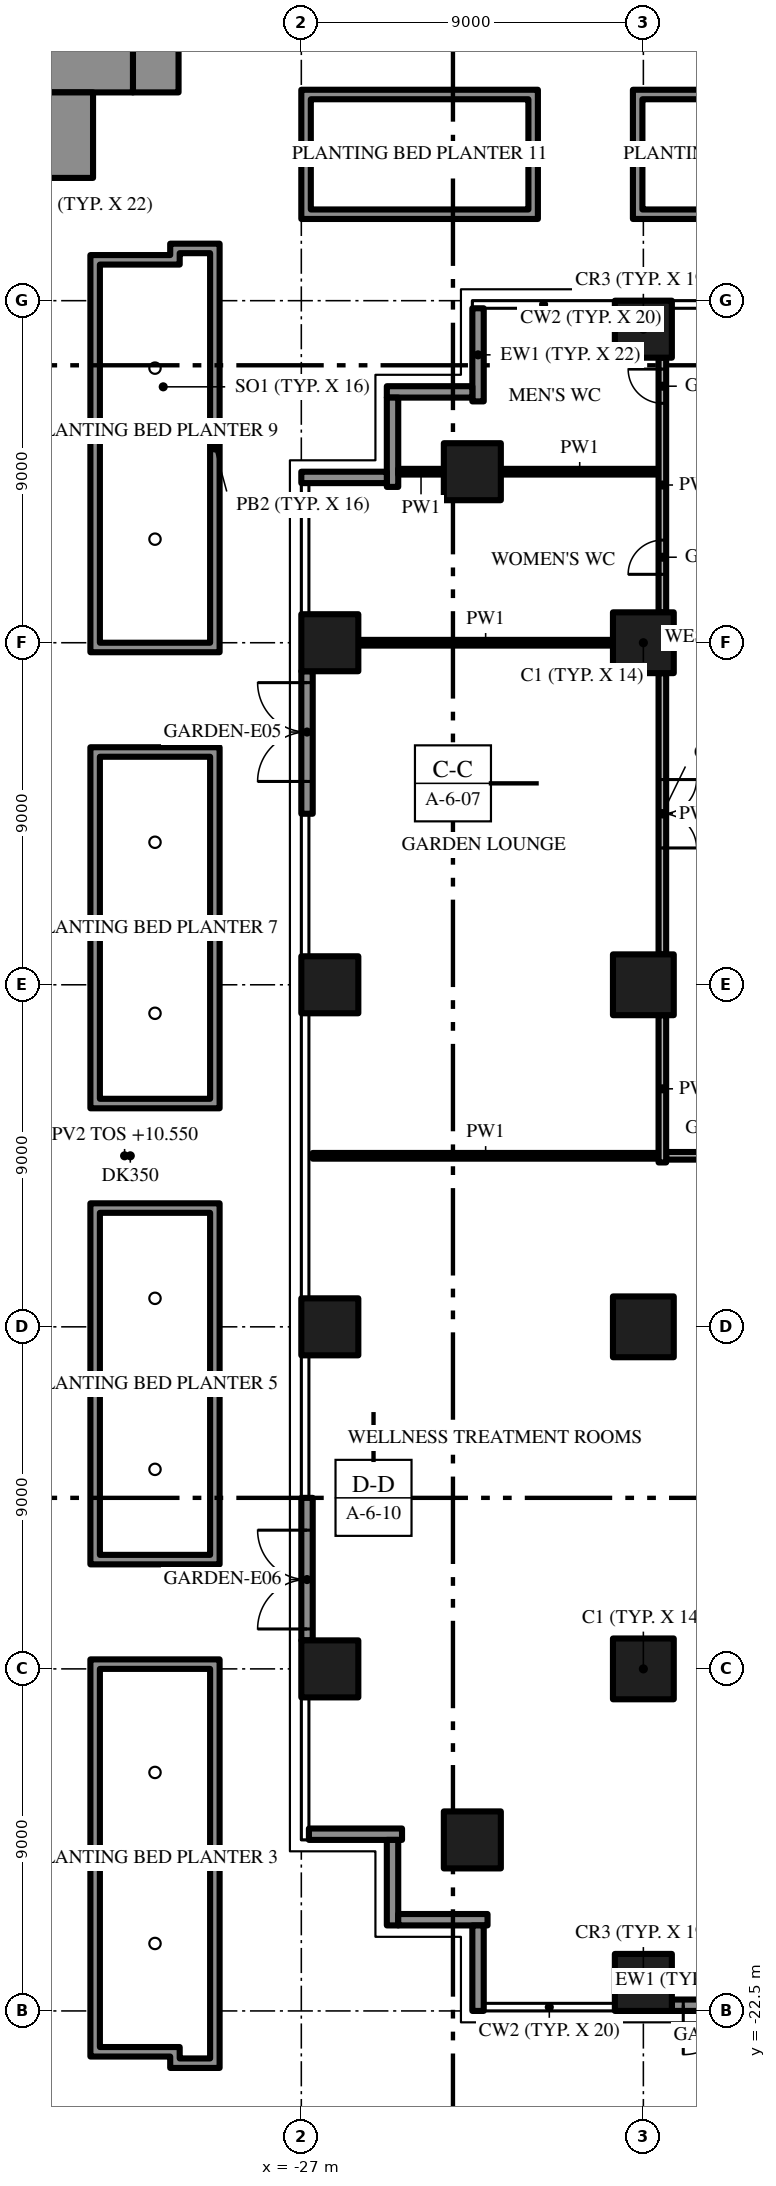
"""IFC4 building model, lengths in metres.
Left out: names, types, materials, properties, quantities, classifications, styles, units other than length and angle.
Written with IfcOpenShell. Run it as: python <this file> out.ifc"""

import sys

from ifc_helpers import new_model, si_unit, direction, frame, frame_2d, origin, origin_2d, place, context, subcontext, project, spatial, polyline, rectangle, outline, extrude, element, fill, save


model = new_model("IFC4")
c1 = context("Model", 3, precision=1e-05, world=origin(), true_north=direction((0.0, 1.0)))
c2 = subcontext(c1, "Body", "Model", "MODEL_VIEW")
j1 = project(units=[si_unit("LENGTHUNIT", "METRE"), si_unit("PLANEANGLEUNIT", "RADIAN")], contexts=[c1])
p1 = place(None, origin())
s1 = spatial("IfcSite", under=j1, at=p1, CompositionType="ELEMENT")
p2 = place(p1, origin())
s2 = spatial("IfcBuilding", under=s1, at=p2, CompositionType="ELEMENT")
p3 = place(p2, frame((0.0, 0.0, 10.5)))
s3 = spatial("IfcBuildingStorey", under=s2, at=p3, CompositionType="ELEMENT", Elevation=10.5)
p4 = place(p3, frame((-18.0, -13.5, 0.0), z_axis=(0.0, 0.0, 1.0), x_axis=(1.0, 0.0, 0.0)))
e1 = element("IfcColumn", 1, at=p4, inside=s3, PredefinedType="COLUMN", context=c2, shape_type="SweptSolid", body=[
    extrude(rectangle(XDim=1.6, YDim=1.6, at=origin_2d()), origin(), (0.0, 0.0, 1.0), 4.2),
])
p5 = place(p3, frame((-18.0, -21.75, 0.0), z_axis=(0.0, 0.0, 1.0), x_axis=(1.0, 0.0, 0.0)))
e2 = element("IfcColumn", 2, at=p5, inside=s3, PredefinedType="COLUMN", context=c2, shape_type="SweptSolid", body=[
    extrude(rectangle(XDim=1.5, YDim=1.5, at=origin_2d()), origin(), (0.0, 0.0, 1.0), 4.2),
])
for number, where, z_axis, x_axis in (
    (3, (-18.0, -4.5, 0.0), (0.0, 0.0, 1.0), (1.0, 0.0, 0.0)),
    (4, (-18.0, 13.5, 0.0), (0.0, 0.0, 1.0), (1.0, 0.0, 0.0)),
):
    element("IfcColumn", number, at=place(p3, frame(where, z_axis=z_axis, x_axis=x_axis)), inside=s3, PredefinedType="COLUMN", context=c2, shape_type="SweptSolid", body=[
        extrude(rectangle(XDim=1.6, YDim=1.6, at=origin_2d()), origin(), (0.0, 0.0, 1.0), 4.2),
    ])
p6 = place(p3, frame((-18.0, 21.75, 0.0), z_axis=(0.0, 0.0, 1.0), x_axis=(1.0, 0.0, 0.0)))
e5 = element("IfcColumn", 5, at=p6, inside=s3, PredefinedType="COLUMN", context=c2, shape_type="SweptSolid", body=[
    extrude(rectangle(XDim=1.5, YDim=1.5, at=origin_2d()), origin(), (0.0, 0.0, 1.0), 4.2),
])
p7 = place(p3, frame((-18.0, 4.5, 0.0), z_axis=(0.0, 0.0, 1.0), x_axis=(1.0, 0.0, 0.0)))
e6 = element("IfcColumn", 6, at=p7, inside=s3, PredefinedType="COLUMN", context=c2, shape_type="SweptSolid", body=[
    extrude(rectangle(XDim=1.6, YDim=1.6, at=origin_2d()), origin(), (0.0, 0.0, 1.0), 4.2),
])
for number, where, z_axis, x_axis in (
    (7, (-26.25, -13.5, 0.0), (0.0, 0.0, 1.0), (1.0, 0.0, 0.0)),
    (8, (-22.5, -18.0, 0.0), (0.0, 0.0, 1.0), (1.0, 0.0, 0.0)),
    (9, (-26.25, -4.5, 0.0), (0.0, 0.0, 1.0), (1.0, 0.0, 0.0)),
    (10, (-26.25, 13.5, 0.0), (0.0, 0.0, 1.0), (1.0, 0.0, 0.0)),
    (11, (-22.5, 18.0, 0.0), (0.0, 0.0, 1.0), (1.0, 0.0, 0.0)),
    (12, (-26.25, 4.5, 0.0), (0.0, 0.0, 1.0), (1.0, 0.0, 0.0)),
):
    element("IfcColumn", number, at=place(p3, frame(where, z_axis=z_axis, x_axis=x_axis)), inside=s3, PredefinedType="COLUMN", context=c2, shape_type="SweptSolid", body=[
        extrude(rectangle(XDim=1.5, YDim=1.5, at=origin_2d()), origin(), (0.0, 0.0, 1.0), 4.2),
    ])
p8 = place(p3, frame((-13.5, -22.35, 0.0), z_axis=(0.0, 0.0, 1.0), x_axis=(-1.0, 0.0, 0.0)))
e13 = element("IfcWall", 13, at=p8, inside=s3, PredefinedType="SOLIDWALL", context=c2, shape_type="SweptSolid", body=[
    extrude(rectangle(XDim=3.75, YDim=0.3, at=frame_2d((1.875, 0.0))), origin(), (0.0, 0.0, 1.0), 4.2),
])
p9 = place(p8, frame((0.85, 0.0, 0.0)))
e14 = element("IfcOpeningElement", 14, at=p9, cuts=e13, PredefinedType="OPENING", context=c2, shape_type="SweptSolid", body=[
    extrude(rectangle(XDim=2.6, YDim=2.4, at=frame_2d((1.3, 1.2))), frame((0.0, 0.16, 0.0), z_axis=(0.0, -1.0, 0.0), x_axis=(1.0, 0.0, 0.0)), (0.0, 0.0, 1.0), 0.32),
])
p10 = place(p3, frame((-22.35, 19.85, 0.0), z_axis=(0.0, 0.0, 1.0), x_axis=(0.0, 1.0, 0.0)))
e15 = element("IfcWall", 15, at=p10, inside=s3, PredefinedType="SOLIDWALL", context=c2, shape_type="SweptSolid", body=[
    extrude(rectangle(XDim=2.45, YDim=0.3, at=frame_2d((1.225, 0.0))), origin(), (0.0, 0.0, 1.0), 4.2),
])
p11 = place(p3, frame((-24.75, 20.1, 0.0), z_axis=(0.0, 0.0, 1.0), x_axis=(1.0, 0.0, 0.0)))
e16 = element("IfcWall", 16, at=p11, inside=s3, PredefinedType="SOLIDWALL", context=c2, shape_type="SweptSolid", body=[
    extrude(rectangle(XDim=2.25, YDim=0.3, at=frame_2d((1.125, 0.0))), origin(), (0.0, 0.0, 1.0), 4.2),
])
p12 = place(p3, frame((-24.6, 17.6, 0.0), z_axis=(0.0, 0.0, 1.0), x_axis=(0.0, 1.0, 0.0)))
e17 = element("IfcWall", 17, at=p12, inside=s3, PredefinedType="SOLIDWALL", context=c2, shape_type="SweptSolid", body=[
    extrude(rectangle(XDim=2.35, YDim=0.3, at=frame_2d((1.175, 0.0))), origin(), (0.0, 0.0, 1.0), 4.2),
])
p13 = place(p3, frame((-27.0, 17.85, 0.0), z_axis=(0.0, 0.0, 1.0), x_axis=(1.0, 0.0, 0.0)))
e18 = element("IfcWall", 18, at=p13, inside=s3, PredefinedType="SOLIDWALL", context=c2, shape_type="SweptSolid", body=[
    extrude(rectangle(XDim=2.25, YDim=0.3, at=frame_2d((1.125, 0.0))), origin(), (0.0, 0.0, 1.0), 4.2),
])
p14 = place(p3, frame((-26.85, 9.0, 0.0), z_axis=(0.0, 0.0, 1.0), x_axis=(0.0, 1.0, 0.0)))
e19 = element("IfcWall", 19, at=p14, inside=s3, PredefinedType="SOLIDWALL", context=c2, shape_type="SweptSolid", body=[
    extrude(rectangle(XDim=3.75, YDim=0.3, at=frame_2d((1.875, 0.0))), origin(), (0.0, 0.0, 1.0), 4.2),
])
p15 = place(p14, frame((0.85, 0.0, 0.0)))
e20 = element("IfcOpeningElement", 20, at=p15, cuts=e19, PredefinedType="OPENING", context=c2, shape_type="SweptSolid", body=[
    extrude(rectangle(XDim=2.6, YDim=2.4, at=frame_2d((1.3, 1.2))), frame((0.0, 0.16, 0.0), z_axis=(0.0, -1.0, 0.0), x_axis=(1.0, 0.0, 0.0)), (0.0, 0.0, 1.0), 0.32),
])
p16 = place(p3, frame((-26.85, -12.75, 0.0), z_axis=(0.0, 0.0, 1.0), x_axis=(0.0, 1.0, 0.0)))
e21 = element("IfcWall", 21, at=p16, inside=s3, PredefinedType="SOLIDWALL", context=c2, shape_type="SweptSolid", body=[
    extrude(rectangle(XDim=3.75, YDim=0.3, at=frame_2d((1.875, 0.0))), origin(), (0.0, 0.0, 1.0), 4.2),
])
p17 = place(p16, frame((0.3, 0.0, 0.0)))
e22 = element("IfcOpeningElement", 22, at=p17, cuts=e21, PredefinedType="OPENING", context=c2, shape_type="SweptSolid", body=[
    extrude(rectangle(XDim=2.6, YDim=2.4, at=frame_2d((1.3, 1.2))), frame((0.0, 0.16, 0.0), z_axis=(0.0, -1.0, 0.0), x_axis=(1.0, 0.0, 0.0)), (0.0, 0.0, 1.0), 0.32),
])
p18 = place(p3, frame((-24.35, -17.85, 0.0), z_axis=(0.0, 0.0, 1.0), x_axis=(-1.0, 0.0, 0.0)))
e23 = element("IfcWall", 23, at=p18, inside=s3, PredefinedType="SOLIDWALL", context=c2, shape_type="SweptSolid", body=[
    extrude(rectangle(XDim=2.45, YDim=0.3, at=frame_2d((1.225, 0.0))), origin(), (0.0, 0.0, 1.0), 4.2),
])
p19 = place(p3, frame((-24.6, -20.25, 0.0), z_axis=(0.0, 0.0, 1.0), x_axis=(0.0, 1.0, 0.0)))
e24 = element("IfcWall", 24, at=p19, inside=s3, PredefinedType="SOLIDWALL", context=c2, shape_type="SweptSolid", body=[
    extrude(rectangle(XDim=2.25, YDim=0.3, at=frame_2d((1.125, 0.0))), origin(), (0.0, 0.0, 1.0), 4.2),
])
p20 = place(p3, frame((-22.1, -20.1, 0.0), z_axis=(0.0, 0.0, 1.0), x_axis=(-1.0, 0.0, 0.0)))
e25 = element("IfcWall", 25, at=p20, inside=s3, PredefinedType="SOLIDWALL", context=c2, shape_type="SweptSolid", body=[
    extrude(rectangle(XDim=2.35, YDim=0.3, at=frame_2d((1.175, 0.0))), origin(), (0.0, 0.0, 1.0), 4.2),
])
p21 = place(p3, frame((-22.35, -22.5, 0.0), z_axis=(0.0, 0.0, 1.0), x_axis=(0.0, 1.0, 0.0)))
e26 = element("IfcWall", 26, at=p21, inside=s3, PredefinedType="SOLIDWALL", context=c2, shape_type="SweptSolid", body=[
    extrude(rectangle(XDim=2.25, YDim=0.3, at=frame_2d((1.125, 0.0))), origin(), (0.0, 0.0, 1.0), 4.2),
])
for number, where, z_axis, x_axis in (
    (27, (-30.83, 30.23, 0.05), (0.0, 0.0, 1.0), (0.0, -1.0, 0.0)),
    (28, (-31.43, 28.58, 0.05), (0.0, 0.0, 1.0), (-1.0, 0.0, 0.0)),
    (29, (-33.08, 27.98, 0.05), (0.0, 0.0, 1.0), (0.0, -1.0, 0.0)),
):
    element("IfcWall", number, at=place(p3, frame(where, z_axis=z_axis, x_axis=x_axis)), inside=s3, PredefinedType="USERDEFINED", context=c2, shape_type="SweptSolid", body=[
        extrude(rectangle(XDim=2.25, YDim=1.2, at=frame_2d((1.125, 0.0))), origin(), (0.0, 0.0, 1.0), 0.9),
    ])
p22 = place(p3, frame((-17.4, 0.0, 0.0), z_axis=(0.0, 0.0, 1.0), x_axis=(1.0, 0.0, 0.0)))
e30 = element("IfcWall", 30, at=p22, inside=s3, PredefinedType="PARTITIONING", context=c2, shape_type="SweptSolid", body=[
    extrude(rectangle(XDim=34.8, YDim=0.2, at=frame_2d((17.4, 0.0))), origin(), (0.0, 0.0, 1.0), 4.2),
])
p23 = place(p22, frame((0.9, 0.0, 0.0)))
e31 = element("IfcOpeningElement", 31, at=p23, cuts=e30, PredefinedType="OPENING", context=c2, shape_type="SweptSolid", body=[
    extrude(rectangle(XDim=2.0, YDim=2.4, at=frame_2d((1.0, 1.2))), frame((0.0, 0.11, 0.0), z_axis=(0.0, -1.0, 0.0), x_axis=(1.0, 0.0, 0.0)), (0.0, 0.0, 1.0), 0.22),
])
p24 = place(p22, frame((16.4, 0.0, 0.0)))
e32 = element("IfcOpeningElement", 32, at=p24, cuts=e30, PredefinedType="OPENING", context=c2, shape_type="SweptSolid", body=[
    extrude(rectangle(XDim=2.0, YDim=2.4, at=frame_2d((1.0, 1.2))), frame((0.0, 0.11, 0.0), z_axis=(0.0, -1.0, 0.0), x_axis=(1.0, 0.0, 0.0)), (0.0, 0.0, 1.0), 0.22),
])
p25 = place(p22, frame((31.9, 0.0, 0.0)))
e33 = element("IfcOpeningElement", 33, at=p25, cuts=e30, PredefinedType="OPENING", context=c2, shape_type="SweptSolid", body=[
    extrude(rectangle(XDim=2.0, YDim=2.4, at=frame_2d((1.0, 1.2))), frame((0.0, 0.11, 0.0), z_axis=(0.0, -1.0, 0.0), x_axis=(1.0, 0.0, 0.0)), (0.0, 0.0, 1.0), 0.22),
])
p26 = place(p3, frame((-26.7, 0.0, 0.0), z_axis=(0.0, 0.0, 1.0), x_axis=(1.0, 0.0, 0.0)))
e34 = element("IfcWall", 34, at=p26, inside=s3, PredefinedType="PARTITIONING", context=c2, shape_type="SweptSolid", body=[
    extrude(rectangle(XDim=9.1, YDim=0.15, at=frame_2d((4.55, 0.0))), origin(), (0.0, 0.0, 1.0), 4.2),
])
p27 = place(p3, frame((-25.5, 13.5, 0.0), z_axis=(0.0, 0.0, 1.0), x_axis=(1.0, 0.0, 0.0)))
e35 = element("IfcWall", 35, at=p27, inside=s3, PredefinedType="PARTITIONING", context=c2, shape_type="SweptSolid", body=[
    extrude(rectangle(XDim=6.7, YDim=0.15, at=frame_2d((3.35, 0.0))), origin(), (0.0, 0.0, 1.0), 4.2),
])
p28 = place(p3, frame((-24.45, 18.0, 0.0), z_axis=(0.0, 0.0, 1.0), x_axis=(1.0, 0.0, 0.0)))
e36 = element("IfcWall", 36, at=p28, inside=s3, PredefinedType="PARTITIONING", context=c2, shape_type="SweptSolid", body=[
    extrude(rectangle(XDim=1.2, YDim=0.15, at=frame_2d((0.6, 0.0))), origin(), (0.0, 0.0, 1.0), 4.2),
])
p29 = place(p3, frame((-21.75, 18.0, 0.0), z_axis=(0.0, 0.0, 1.0), x_axis=(1.0, 0.0, 0.0)))
e37 = element("IfcWall", 37, at=p29, inside=s3, PredefinedType="PARTITIONING", context=c2, shape_type="SweptSolid", body=[
    extrude(rectangle(XDim=4.15, YDim=0.15, at=frame_2d((2.075, 0.0))), origin(), (0.0, 0.0, 1.0), 4.2),
])
p30 = place(p3, frame((-17.5, -0.175, 0.0), z_axis=(0.0, 0.0, 1.0), x_axis=(0.0, 1.0, 0.0)))
e38 = element("IfcWall", 38, at=p30, inside=s3, PredefinedType="PARTITIONING", context=c2, shape_type="SweptSolid", body=[
    extrude(rectangle(XDim=3.875, YDim=0.2, at=frame_2d((1.938, 0.0))), origin(), (0.0, 0.0, 1.0), 4.2),
])
p31 = place(p3, frame((-17.5, 12.7, 0.0), z_axis=(0.0, 0.0, 1.0), x_axis=(0.0, -1.0, 0.0)))
e39 = element("IfcWall", 39, at=p31, inside=s3, PredefinedType="PARTITIONING", context=c2, shape_type="SweptSolid", body=[
    extrude(rectangle(XDim=7.4, YDim=0.2, at=frame_2d((3.7, 0.0))), origin(), (0.0, 0.0, 1.0), 4.2),
])
p32 = place(p31, frame((2.8, 0.0, 0.0)))
e40 = element("IfcOpeningElement", 40, at=p32, cuts=e39, PredefinedType="OPENING", context=c2, shape_type="SweptSolid", body=[
    extrude(rectangle(XDim=1.8, YDim=2.4, at=frame_2d((0.9, 1.2))), frame((0.0, 0.11, 0.0), z_axis=(0.0, -1.0, 0.0), x_axis=(1.0, 0.0, 0.0)), (0.0, 0.0, 1.0), 0.22),
])
p33 = place(p3, frame((-17.5, 14.3, 0.0), z_axis=(0.0, 0.0, 1.0), x_axis=(0.0, 1.0, 0.0)))
e41 = element("IfcWall", 41, at=p33, inside=s3, PredefinedType="PARTITIONING", context=c2, shape_type="SweptSolid", body=[
    extrude(rectangle(XDim=6.7, YDim=0.2, at=frame_2d((3.35, 0.0))), origin(), (0.0, 0.0, 1.0), 4.2),
])
p34 = place(p33, frame((1.0, 0.0, 0.0)))
e42 = element("IfcOpeningElement", 42, at=p34, cuts=e41, PredefinedType="OPENING", context=c2, shape_type="SweptSolid", body=[
    extrude(rectangle(XDim=0.9, YDim=2.1, at=frame_2d((0.45, 1.05))), frame((0.0, 0.11, 0.0), z_axis=(0.0, -1.0, 0.0), x_axis=(1.0, 0.0, 0.0)), (0.0, 0.0, 1.0), 0.22),
])
p35 = place(p33, frame((5.5, 0.0, 0.0)))
e43 = element("IfcOpeningElement", 43, at=p35, cuts=e41, PredefinedType="OPENING", context=c2, shape_type="SweptSolid", body=[
    extrude(rectangle(XDim=0.9, YDim=2.1, at=frame_2d((0.45, 1.05))), frame((0.0, 0.11, 0.0), z_axis=(0.0, -1.0, 0.0), x_axis=(1.0, 0.0, 0.0)), (0.0, 0.0, 1.0), 0.22),
])
p36 = place(p3, frame((0.0, 0.0, 0.05)))
e44 = element("IfcWall", 44, at=p36, inside=s3, PredefinedType="USERDEFINED", context=c2, shape_type="SweptSolid", body=[
    extrude(outline(polyline([(-32.55, -13.25), (-32.55, -23.7), (-30.45, -23.7), (-30.45, -24.0), (-29.15, -24.0), (-29.15, -13.25), (-32.55, -13.25)]), holes=[polyline([(-29.4, -13.5), (-29.4, -23.75), (-30.2, -23.75), (-30.2, -23.45), (-32.3, -23.45), (-32.3, -13.5), (-29.4, -13.5)])]), origin(), (0.0, 0.0, 1.0), 0.9),
])
p37 = place(p3, frame((0.0, 0.0, 0.05)))
e45 = element("IfcWall", 45, at=p37, inside=s3, PredefinedType="USERDEFINED", context=c2, shape_type="SweptSolid", body=[
    extrude(outline(polyline([(-32.55, -10.75), (-29.15, -10.75), (-29.15, -1.25), (-32.55, -1.25), (-32.55, -10.75)]), holes=[polyline([(-32.3, -1.5), (-29.4, -1.5), (-29.4, -10.5), (-32.3, -10.5), (-32.3, -1.5)])]), origin(), (0.0, 0.0, 1.0), 0.9),
])
p38 = place(p3, frame((0.0, 0.0, 0.05)))
e46 = element("IfcWall", 46, at=p38, inside=s3, PredefinedType="USERDEFINED", context=c2, shape_type="SweptSolid", body=[
    extrude(outline(polyline([(-32.55, 1.25), (-29.15, 1.25), (-29.15, 10.75), (-32.55, 10.75), (-32.55, 1.25)]), holes=[polyline([(-32.3, 10.5), (-29.4, 10.5), (-29.4, 1.5), (-32.3, 1.5), (-32.3, 10.5)])]), origin(), (0.0, 0.0, 1.0), 0.9),
])
p39 = place(p3, frame((0.0, 0.0, 0.05)))
e47 = element("IfcWall", 47, at=p39, inside=s3, PredefinedType="USERDEFINED", context=c2, shape_type="SweptSolid", body=[
    extrude(outline(polyline([(-29.15, 24.0), (-30.45, 24.0), (-30.45, 23.7), (-32.55, 23.7), (-32.55, 13.25), (-29.15, 13.25), (-29.15, 24.0)]), holes=[polyline([(-29.4, 13.5), (-32.3, 13.5), (-32.3, 23.45), (-30.2, 23.45), (-30.2, 23.75), (-29.4, 23.75), (-29.4, 13.5)])]), origin(), (0.0, 0.0, 1.0), 0.9),
])
p40 = place(p3, frame((0.0, 0.0, 0.05)))
e48 = element("IfcWall", 48, at=p40, inside=s3, PredefinedType="USERDEFINED", context=c2, shape_type="SweptSolid", body=[
    extrude(outline(polyline([(-27.0, 24.65), (-20.775, 24.65), (-20.775, 28.05), (-27.0, 28.05), (-27.0, 24.65)]), holes=[polyline([(-26.75, 27.8), (-21.025, 27.8), (-21.025, 24.9), (-26.75, 24.9), (-26.75, 27.8)])]), origin(), (0.0, 0.0, 1.0), 0.9),
])
p41 = place(p3, frame((0.0, 0.0, 0.05)))
e49 = element("IfcWall", 49, at=p41, inside=s3, PredefinedType="USERDEFINED", context=c2, shape_type="SweptSolid", body=[
    extrude(outline(polyline([(-18.275, 24.65), (-12.05, 24.65), (-12.05, 28.05), (-18.275, 28.05), (-18.275, 24.65)]), holes=[polyline([(-18.025, 27.8), (-12.3, 27.8), (-12.3, 24.9), (-18.025, 24.9), (-18.025, 27.8)])]), origin(), (0.0, 0.0, 1.0), 0.9),
])
p42 = place(p9, origin())
e50 = element("IfcDoor", 50, at=p42, inside=s3, OperationType="SINGLE_SWING_LEFT", PredefinedType="DOOR", context=c2, shape_type="SweptSolid", body=[
    extrude(rectangle(XDim=2.6, YDim=2.4, at=frame_2d((1.3, 1.2))), frame((0.0, 0.025, 0.0), z_axis=(0.0, -1.0, 0.0), x_axis=(1.0, 0.0, 0.0)), (0.0, 0.0, 1.0), 0.05),
])
fill(e14, e50)
p43 = place(p15, origin())
e51 = element("IfcDoor", 51, at=p43, inside=s3, OperationType="SINGLE_SWING_LEFT", PredefinedType="DOOR", context=c2, shape_type="SweptSolid", body=[
    extrude(rectangle(XDim=2.6, YDim=2.4, at=frame_2d((1.3, 1.2))), frame((0.0, 0.025, 0.0), z_axis=(0.0, -1.0, 0.0), x_axis=(1.0, 0.0, 0.0)), (0.0, 0.0, 1.0), 0.05),
])
fill(e20, e51)
p44 = place(p17, origin())
e52 = element("IfcDoor", 52, at=p44, inside=s3, OperationType="SINGLE_SWING_LEFT", PredefinedType="DOOR", context=c2, shape_type="SweptSolid", body=[
    extrude(rectangle(XDim=2.6, YDim=2.4, at=frame_2d((1.3, 1.2))), frame((0.0, 0.025, 0.0), z_axis=(0.0, -1.0, 0.0), x_axis=(1.0, 0.0, 0.0)), (0.0, 0.0, 1.0), 0.05),
])
fill(e22, e52)
p45 = place(p32, origin())
e53 = element("IfcDoor", 53, at=p45, inside=s3, OperationType="DOUBLE_DOOR_SINGLE_SWING", PredefinedType="DOOR", context=c2, shape_type="SweptSolid", body=[
    extrude(rectangle(XDim=1.8, YDim=2.4, at=frame_2d((0.9, 1.2))), frame((0.0, 0.025, 0.0), z_axis=(0.0, -1.0, 0.0), x_axis=(1.0, 0.0, 0.0)), (0.0, 0.0, 1.0), 0.05),
])
fill(e40, e53)
p46 = place(p34, origin())
e54 = element("IfcDoor", 54, at=p46, inside=s3, OperationType="SINGLE_SWING_LEFT", PredefinedType="DOOR", context=c2, shape_type="SweptSolid", body=[
    extrude(rectangle(XDim=0.9, YDim=2.1, at=frame_2d((0.45, 1.05))), frame((0.0, 0.025, 0.0), z_axis=(0.0, -1.0, 0.0), x_axis=(1.0, 0.0, 0.0)), (0.0, 0.0, 1.0), 0.05),
])
fill(e42, e54)
p47 = place(p35, origin())
e55 = element("IfcDoor", 55, at=p47, inside=s3, OperationType="SINGLE_SWING_RIGHT", PredefinedType="DOOR", context=c2, shape_type="SweptSolid", body=[
    extrude(rectangle(XDim=0.9, YDim=2.1, at=frame_2d((0.45, 1.05))), frame((0.0, 0.025, 0.0), z_axis=(0.0, -1.0, 0.0), x_axis=(1.0, 0.0, 0.0)), (0.0, 0.0, 1.0), 0.05),
])
fill(e43, e55)
save(model, sys.argv[1])
